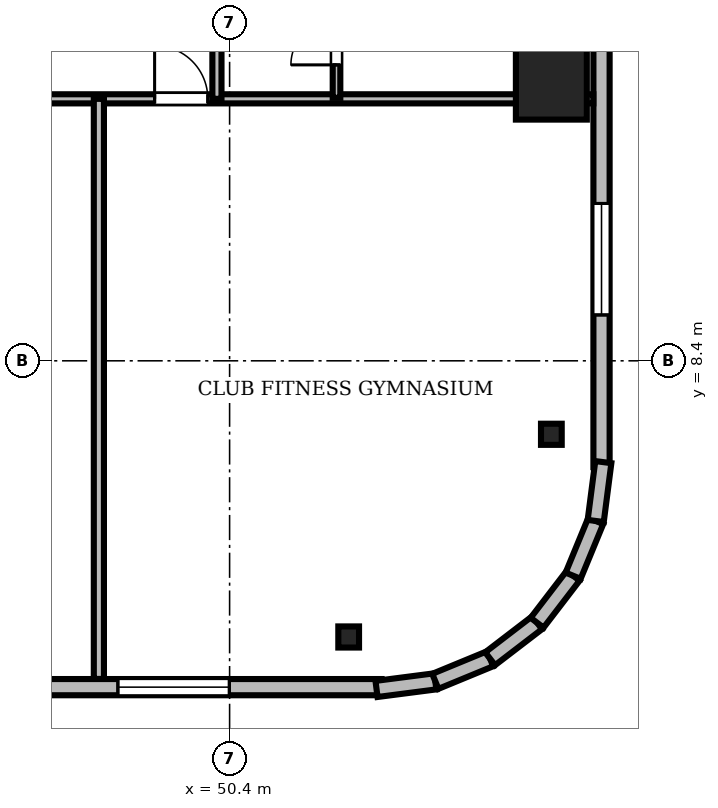
"""IFC4 building model, lengths in metres.
Left out: names, types, materials, properties, quantities, classifications, styles, units other than length and angle.
Written with IfcOpenShell. Run it as: python <this file> out.ifc"""

import sys

from ifc_helpers import new_model, si_unit, direction, frame, frame_2d, origin, origin_2d, place, context, subcontext, project, spatial, rectangle, i_section, extrude, source, transform, mapped, element, fill, save


model = new_model("IFC4")
c1 = context("Model", 3, precision=1e-05, world=origin(), true_north=direction((0.0, 1.0)))
c2 = subcontext(c1, "Body", "Model", "MODEL_VIEW")
j1 = project(units=[si_unit("LENGTHUNIT", "METRE"), si_unit("PLANEANGLEUNIT", "RADIAN")], contexts=[c1])
p1 = place(None, origin())
s1 = spatial("IfcSite", under=j1, at=p1, CompositionType="ELEMENT")
p2 = place(p1, origin())
s2 = spatial("IfcBuilding", under=s1, at=p2, CompositionType="ELEMENT")
p3 = place(p2, frame((0.0, 0.0, 192.3)))
s3 = spatial("IfcBuildingStorey", under=s2, at=p3, CompositionType="ELEMENT", Elevation=192.3)
m1 = source(origin(), c2, "Body", "SweptSolid", [
    extrude(rectangle(XDim=1.4, YDim=1.4, at=origin_2d()), origin(), (0.0, 0.0, 1.0), 3.53),
])
p4 = place(p3, frame((56.75, 13.86, 0.0), z_axis=(0.0, 0.0, 1.0), x_axis=(1.0, 0.0, 0.0)))
e1 = element("IfcColumn", 1, at=p4, inside=s3, PredefinedType="COLUMN", context=c2, shape_type="MappedRepresentation", body=[
    mapped(m1, transform((0.0, 0.0, 0.0), scale=1.0)),
])
m2 = source(origin(), c2, "Body", "SweptSolid", [
    extrude(i_section(OverallWidth=0.409, OverallDepth=0.417, WebThickness=0.021, FlangeThickness=0.033, FilletRadius=0.015, at=origin_2d()), origin(), (0.0, 0.0, 1.0), 3.53),
])
for number, where, z_axis, x_axis in (
    (2, (52.75, 2.95, 0.0), (0.0, 0.0, 1.0), (1.0, 0.0, 0.0)),
    (3, (56.75, 6.95, 0.0), (0.0, 0.0, 1.0), (1.0, 0.0, 0.0)),
):
    element("IfcColumn", number, at=place(p3, frame(where, z_axis=z_axis, x_axis=x_axis)), inside=s3, PredefinedType="COLUMN", context=c2, shape_type="MappedRepresentation", body=[
        mapped(m2, transform((0.0, 0.0, 0.0), scale=1.0)),
    ])
m3 = source(origin(), c2, "Body", "SweptSolid", [
    extrude(rectangle(XDim=15.6, YDim=0.32, at=frame_2d((7.8, 0.0))), origin(), (0.0, 0.0, 1.0), 3.53),
])
p5 = place(p3, frame((37.8, 1.96, 0.0), z_axis=(0.0, 0.0, 1.0), x_axis=(1.0, 0.0, 0.0)))
e4 = element("IfcWall", 4, at=p5, inside=s3, PredefinedType="SOLIDWALL", context=c2, shape_type="MappedRepresentation", body=[
    mapped(m3, transform((0.0, 0.0, 0.0), scale=1.0)),
])
m4 = source(origin(), c2, "Body", "SweptSolid", [
    extrude(rectangle(XDim=1.4, YDim=2.3, at=frame_2d((0.7, 1.15))), frame((0.0, 0.17, 0.0), z_axis=(0.0, -1.0, 0.0), x_axis=(1.0, 0.0, 0.0)), (0.0, 0.0, 1.0), 0.34),
])
p6 = place(p5, frame((4.59, 0.0, 0.0)))
e5 = element("IfcOpeningElement", 5, at=p6, cuts=e4, PredefinedType="OPENING", context=c2, shape_type="MappedRepresentation", body=[
    mapped(m4, transform((0.0, 0.0, 0.0), scale=1.0)),
])
m5 = source(origin(), c2, "Body", "SweptSolid", [
    extrude(rectangle(XDim=2.2, YDim=2.4, at=frame_2d((1.1, 1.2))), frame((0.0, 0.17, 0.0), z_axis=(0.0, -1.0, 0.0), x_axis=(1.0, 0.0, 0.0)), (0.0, 0.0, 1.0), 0.34),
])
p7 = place(p5, frame((10.395, 0.0, 0.72)))
e6 = element("IfcOpeningElement", 6, at=p7, cuts=e4, PredefinedType="OPENING", context=c2, shape_type="MappedRepresentation", body=[
    mapped(m5, transform((0.0, 0.0, 0.0), scale=1.0)),
])
p8 = place(p3, frame((57.74, 6.3, 0.0), z_axis=(0.0, 0.0, 1.0), x_axis=(0.0, 1.0, 0.0)))
e7 = element("IfcWall", 7, at=p8, inside=s3, PredefinedType="SOLIDWALL", context=c2, shape_type="MappedRepresentation", body=[
    mapped(m3, transform((0.0, 0.0, 0.0), scale=1.0)),
])
p9 = place(p8, frame((9.61, 0.0, 0.0)))
e8 = element("IfcOpeningElement", 8, at=p9, cuts=e7, PredefinedType="OPENING", context=c2, shape_type="MappedRepresentation", body=[
    mapped(m4, transform((0.0, 0.0, 0.0), scale=1.0)),
])
p10 = place(p8, frame((3.005, 0.0, 0.72)))
e9 = element("IfcOpeningElement", 9, at=p10, cuts=e7, PredefinedType="OPENING", context=c2, shape_type="MappedRepresentation", body=[
    mapped(m5, transform((0.0, 0.0, 0.0), scale=1.0)),
])
m6 = source(origin(), c2, "Body", "SweptSolid", [
    extrude(rectangle(XDim=1.17, YDim=0.32, at=frame_2d((0.585, 0.0))), origin(), (0.0, 0.0, 1.0), 3.53),
])
p11 = place(p3, frame((53.3, 1.925, 0.0), z_axis=(0.0, 0.0, 1.0), x_axis=(0.991762485493, 0.128090485085, 0.0)))
e10 = element("IfcWall", 10, at=p11, inside=s3, PredefinedType="SOLIDWALL", context=c2, shape_type="MappedRepresentation", body=[
    mapped(m6, transform((0.0, 0.0, 0.0), scale=1.0)),
])
m7 = source(origin(), c2, "Body", "SweptSolid", [
    extrude(rectangle(XDim=1.169, YDim=0.32, at=frame_2d((0.585, 0.0))), origin(), (0.0, 0.0, 1.0), 3.53),
])
p12 = place(p3, frame((54.46, 2.074, 0.0), z_axis=(0.0, 0.0, 1.0), x_axis=(0.924479075121, 0.381232789334, 0.0)))
e11 = element("IfcWall", 11, at=p12, inside=s3, PredefinedType="SOLIDWALL", context=c2, shape_type="MappedRepresentation", body=[
    mapped(m7, transform((0.0, 0.0, 0.0), scale=1.0)),
])
m8 = source(origin(), c2, "Body", "SweptSolid", [
    extrude(rectangle(XDim=1.169, YDim=0.32, at=frame_2d((0.584, 0.0))), origin(), (0.0, 0.0, 1.0), 3.53),
])
p13 = place(p3, frame((55.541, 2.52, 0.0), z_axis=(0.0, 0.0, 1.0), x_axis=(0.793663520347, 0.608356981114, 0.0)))
e12 = element("IfcWall", 12, at=p13, inside=s3, PredefinedType="SOLIDWALL", context=c2, shape_type="MappedRepresentation", body=[
    mapped(m8, transform((0.0, 0.0, 0.0), scale=1.0)),
])
m9 = source(origin(), c2, "Body", "SweptSolid", [
    extrude(rectangle(XDim=1.169, YDim=0.32, at=frame_2d((0.584, 0.0))), origin(), (0.0, 0.0, 1.0), 3.53),
])
for number, where, z_axis, x_axis in (
    (13, (56.469, 3.231, 0.0), (0.0, 0.0, 1.0), (0.608, 0.794, 0.0)),
    (14, (57.18, 4.159, 0.0), (0.0, 0.0, 1.0), (0.381, 0.925, 0.0)),
):
    element("IfcWall", number, at=place(p3, frame(where, z_axis=z_axis, x_axis=x_axis)), inside=s3, PredefinedType="SOLIDWALL", context=c2, shape_type="MappedRepresentation", body=[
        mapped(m9, transform((0.0, 0.0, 0.0), scale=1.0)),
    ])
m10 = source(origin(), c2, "Body", "SweptSolid", [
    extrude(rectangle(XDim=1.171, YDim=0.32, at=frame_2d((0.585, 0.0))), origin(), (0.0, 0.0, 1.0), 3.53),
])
p14 = place(p3, frame((57.625, 5.24, 0.0), z_axis=(0.0, 0.0, 1.0), x_axis=(0.128269133229, 0.991739395941, 0.0)))
e15 = element("IfcWall", 15, at=p14, inside=s3, PredefinedType="SOLIDWALL", context=c2, shape_type="MappedRepresentation", body=[
    mapped(m10, transform((0.0, 0.0, 0.0), scale=1.0)),
])
m11 = source(origin(), c2, "Body", "SweptSolid", [
    extrude(rectangle(XDim=46.156, YDim=0.18, at=frame_2d((23.078, 0.0))), origin(), (0.0, 0.0, 1.0), 2.772),
])
p15 = place(p3, frame((11.422, 13.57, 0.0), z_axis=(0.0, 0.0, 1.0), x_axis=(1.0, 0.0, 0.0)))
e16 = element("IfcWall", 16, at=p15, inside=s3, PredefinedType="PARTITIONING", context=c2, shape_type="MappedRepresentation", body=[
    mapped(m11, transform((0.0, 0.0, 0.0), scale=1.0)),
])
m12 = source(origin(), c2, "Body", "SweptSolid", [
    extrude(rectangle(XDim=1.05, YDim=2.2, at=frame_2d((0.525, 1.1))), frame((0.0, 0.1, 0.0), z_axis=(0.0, -1.0, 0.0), x_axis=(1.0, 0.0, 0.0)), (0.0, 0.0, 1.0), 0.2),
])
p16 = place(p15, frame((11.798, 0.0, 0.0)))
e17 = element("IfcOpeningElement", 17, at=p16, cuts=e16, PredefinedType="OPENING", context=c2, shape_type="MappedRepresentation", body=[
    mapped(m12, transform((0.0, 0.0, 0.0), scale=1.0)),
])
p17 = place(p15, frame((16.503, 0.0, 0.0)))
e18 = element("IfcOpeningElement", 18, at=p17, cuts=e16, PredefinedType="OPENING", context=c2, shape_type="MappedRepresentation", body=[
    mapped(m12, transform((0.0, 0.0, 0.0), scale=1.0)),
])
p18 = place(p15, frame((24.253, 0.0, 0.0)))
e19 = element("IfcOpeningElement", 19, at=p18, cuts=e16, PredefinedType="OPENING", context=c2, shape_type="MappedRepresentation", body=[
    mapped(m12, transform((0.0, 0.0, 0.0), scale=1.0)),
])
p19 = place(p15, frame((32.003, 0.0, 0.0)))
e20 = element("IfcOpeningElement", 20, at=p19, cuts=e16, PredefinedType="OPENING", context=c2, shape_type="MappedRepresentation", body=[
    mapped(m12, transform((0.0, 0.0, 0.0), scale=1.0)),
])
p20 = place(p15, frame((37.498, 0.0, 0.0)))
e21 = element("IfcOpeningElement", 21, at=p20, cuts=e16, PredefinedType="OPENING", context=c2, shape_type="MappedRepresentation", body=[
    mapped(m12, transform((0.0, 0.0, 0.0), scale=1.0)),
])
m13 = source(origin(), c2, "Body", "SweptSolid", [
    extrude(rectangle(XDim=27.53, YDim=0.18, at=frame_2d((13.765, 0.0))), origin(), (0.0, 0.0, 1.0), 2.972),
])
p21 = place(p3, frame((50.15, 13.57, 0.0), z_axis=(0.0, 0.0, 1.0), x_axis=(0.0, 1.0, 0.0)))
e22 = element("IfcWall", 22, at=p21, inside=s3, PredefinedType="PARTITIONING", context=c2, shape_type="MappedRepresentation", body=[
    mapped(m13, transform((0.0, 0.0, 0.0), scale=1.0)),
])
p22 = place(p21, frame((5.217, 0.0, 0.0)))
e23 = element("IfcOpeningElement", 23, at=p22, cuts=e22, PredefinedType="OPENING", context=c2, shape_type="MappedRepresentation", body=[
    mapped(m12, transform((0.0, 0.0, 0.0), scale=1.0)),
])
p23 = place(p21, frame((14.32, 0.0, 0.0)))
e24 = element("IfcOpeningElement", 24, at=p23, cuts=e22, PredefinedType="OPENING", context=c2, shape_type="MappedRepresentation", body=[
    mapped(m12, transform((0.0, 0.0, 0.0), scale=1.0)),
])
p24 = place(p21, frame((23.423, 0.0, 0.0)))
e25 = element("IfcOpeningElement", 25, at=p24, cuts=e22, PredefinedType="OPENING", context=c2, shape_type="MappedRepresentation", body=[
    mapped(m12, transform((0.0, 0.0, 0.0), scale=1.0)),
])
m14 = source(origin(), c2, "Body", "SweptSolid", [
    extrude(rectangle(XDim=2.29, YDim=0.15, at=frame_2d((1.145, 0.0))), origin(), (0.0, 0.0, 1.0), 2.972),
])
p25 = place(p3, frame((52.51, 13.59, 0.0), z_axis=(0.0, 0.0, 1.0), x_axis=(0.0, 1.0, 0.0)))
e26 = element("IfcWall", 26, at=p25, inside=s3, PredefinedType="PARTITIONING", context=c2, shape_type="MappedRepresentation", body=[
    mapped(m14, transform((0.0, 0.0, 0.0), scale=1.0)),
])
m15 = source(origin(), c2, "Body", "SweptSolid", [
    extrude(rectangle(XDim=0.9, YDim=2.1, at=frame_2d((0.45, 1.05))), frame((0.0, 0.085, 0.0), z_axis=(0.0, -1.0, 0.0), x_axis=(1.0, 0.0, 0.0)), (0.0, 0.0, 1.0), 0.17),
])
p26 = place(p25, frame((0.65, 0.0, 0.0)))
e27 = element("IfcOpeningElement", 27, at=p26, cuts=e26, PredefinedType="OPENING", context=c2, shape_type="MappedRepresentation", body=[
    mapped(m15, transform((0.0, 0.0, 0.0), scale=1.0)),
])
m16 = source(origin(), c2, "Body", "SweptSolid", [
    extrude(rectangle(XDim=11.448, YDim=0.2, at=frame_2d((5.724, 0.0))), origin(), (0.0, 0.0, 1.0), 2.772),
])
p27 = place(p3, frame((47.82, 2.122, 0.0), z_axis=(0.0, 0.0, 1.0), x_axis=(0.0, 1.0, 0.0)))
e28 = element("IfcWall", 28, at=p27, inside=s3, PredefinedType="PARTITIONING", context=c2, shape_type="MappedRepresentation", body=[
    mapped(m16, transform((0.0, 0.0, 0.0), scale=1.0)),
])
m17 = source(origin(), c2, "Body", "SweptSolid", [
    extrude(rectangle(XDim=2.2, YDim=2.4, at=frame_2d((1.1, 1.2))), frame((0.0, 0.03, 0.0), z_axis=(0.0, -1.0, 0.0), x_axis=(1.0, 0.0, 0.0)), (0.0, 0.0, 1.0), 0.06),
])
p28 = place(p7, origin())
e29 = element("IfcWindow", 29, at=p28, inside=s3, PartitioningType="SINGLE_PANEL", PredefinedType="WINDOW", context=c2, shape_type="MappedRepresentation", body=[
    mapped(m17, transform((0.0, 0.0, 0.0), scale=1.0)),
])
fill(e6, e29)
p29 = place(p10, origin())
e30 = element("IfcWindow", 30, at=p29, inside=s3, PartitioningType="SINGLE_PANEL", PredefinedType="WINDOW", context=c2, shape_type="MappedRepresentation", body=[
    mapped(m17, transform((0.0, 0.0, 0.0), scale=1.0)),
])
fill(e9, e30)
m18 = source(origin(), c2, "Body", "SweptSolid", [
    extrude(rectangle(XDim=1.05, YDim=2.2, at=frame_2d((0.525, 1.1))), frame((0.0, 0.025, 0.0), z_axis=(0.0, -1.0, 0.0), x_axis=(1.0, 0.0, 0.0)), (0.0, 0.0, 1.0), 0.05),
])
p30 = place(p20, origin())
e31 = element("IfcDoor", 31, at=p30, inside=s3, OperationType="SINGLE_SWING_LEFT", PredefinedType="DOOR", context=c2, shape_type="MappedRepresentation", body=[
    mapped(m18, transform((0.0, 0.0, 0.0), scale=1.0)),
])
fill(e21, e31)
m19 = source(origin(), c2, "Body", "SweptSolid", [
    extrude(rectangle(XDim=0.9, YDim=2.1, at=frame_2d((0.45, 1.05))), frame((0.0, 0.025, 0.0), z_axis=(0.0, -1.0, 0.0), x_axis=(1.0, 0.0, 0.0)), (0.0, 0.0, 1.0), 0.05),
])
p31 = place(p26, origin())
e32 = element("IfcDoor", 32, at=p31, inside=s3, OperationType="SINGLE_SWING_LEFT", PredefinedType="DOOR", context=c2, shape_type="MappedRepresentation", body=[
    mapped(m19, transform((0.0, 0.0, 0.0), scale=1.0)),
])
fill(e27, e32)
save(model, sys.argv[1])
